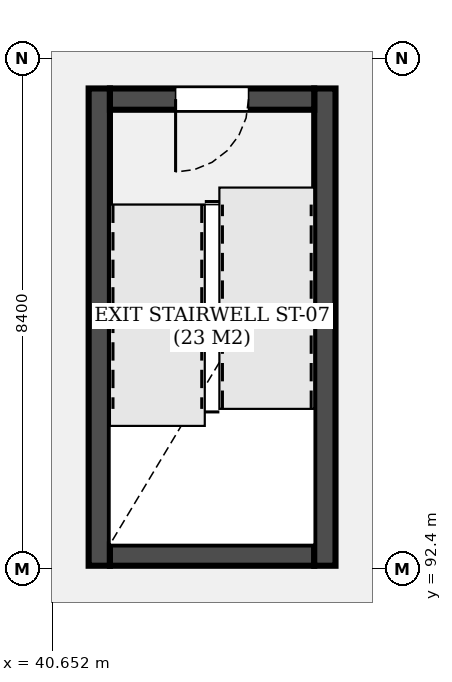
"""IFC4 building model, lengths in metres.
Left out: names, types, materials, properties, quantities, classifications, styles, units other than length and angle.
Written with IfcOpenShell. Run it as: python <this file> out.ifc"""

import sys

from ifc_helpers import new_model, si_unit, direction, frame, frame_2d, origin, place, context, subcontext, project, spatial, rectangle, extrude, element, fill, save


model = new_model("IFC4")
c1 = context("Model", 3, precision=1e-05, world=origin(), true_north=direction((0.0, 1.0)))
c2 = subcontext(c1, "Body", "Model", "MODEL_VIEW")
j1 = project(units=[si_unit("LENGTHUNIT", "METRE"), si_unit("PLANEANGLEUNIT", "RADIAN")], contexts=[c1])
p1 = place(None, origin())
s1 = spatial("IfcSite", under=j1, at=p1, CompositionType="ELEMENT")
p2 = place(p1, origin())
s2 = spatial("IfcBuilding", under=s1, at=p2, CompositionType="ELEMENT")
p3 = place(p2, frame((0.0, 0.0, 5.1)))
s3 = spatial("IfcBuildingStorey", under=s2, at=p3, CompositionType="ELEMENT", Elevation=5.1)
p4 = place(p3, frame((41.425, 100.3, 0.0), z_axis=(0.0, 0.0, 1.0), x_axis=(0.0, -1.0, 0.0)))
e1 = element("IfcWall", 1, at=p4, inside=s3, PredefinedType="SHEAR", context=c2, shape_type="SweptSolid", body=[
    extrude(rectangle(XDim=7.85, YDim=0.35, at=frame_2d((3.925, 0.0))), origin(), (0.0, 0.0, 1.0), 4.8),
])
p5 = place(p3, frame((41.6, 92.625, 0.0), z_axis=(0.0, 0.0, 1.0), x_axis=(1.0, 0.0, 0.0)))
e2 = element("IfcWall", 2, at=p5, inside=s3, PredefinedType="SHEAR", context=c2, shape_type="SweptSolid", body=[
    extrude(rectangle(XDim=3.36, YDim=0.35, at=frame_2d((1.68, 0.0))), origin(), (0.0, 0.0, 1.0), 4.8),
])
p6 = place(p3, frame((45.135, 92.45, 0.0), z_axis=(0.0, 0.0, 1.0), x_axis=(0.0, 1.0, 0.0)))
e3 = element("IfcWall", 3, at=p6, inside=s3, PredefinedType="SHEAR", context=c2, shape_type="SweptSolid", body=[
    extrude(rectangle(XDim=7.85, YDim=0.35, at=frame_2d((3.925, 0.0))), origin(), (0.0, 0.0, 1.0), 4.8),
])
p7 = place(p3, frame((44.96, 100.125, 0.0), z_axis=(0.0, 0.0, 1.0), x_axis=(-1.0, 0.0, 0.0)))
e4 = element("IfcWall", 4, at=p7, inside=s3, PredefinedType="SHEAR", context=c2, shape_type="SweptSolid", body=[
    extrude(rectangle(XDim=3.36, YDim=0.35, at=frame_2d((1.68, 0.0))), origin(), (0.0, 0.0, 1.0), 4.8),
])
p8 = place(p7, frame((1.08, 0.0, 0.0)))
e5 = element("IfcOpeningElement", 5, at=p8, cuts=e4, PredefinedType="OPENING", context=c2, shape_type="SweptSolid", body=[
    extrude(rectangle(XDim=1.2, YDim=2.2, at=frame_2d((0.6, 1.1))), frame((0.0, 0.185, 0.0), z_axis=(0.0, -1.0, 0.0), x_axis=(1.0, 0.0, 0.0)), (0.0, 0.0, 1.0), 0.37),
])
p9 = place(p8, origin())
e6 = element("IfcDoor", 6, at=p9, inside=s3, OperationType="SINGLE_SWING_RIGHT", PredefinedType="DOOR", context=c2, shape_type="SweptSolid", body=[
    extrude(rectangle(XDim=1.2, YDim=2.2, at=frame_2d((0.6, 1.1))), frame((0.0, 0.025, 0.0), z_axis=(0.0, -1.0, 0.0), x_axis=(1.0, 0.0, 0.0)), (0.0, 0.0, 1.0), 0.05),
])
fill(e5, e6)
save(model, sys.argv[1])
